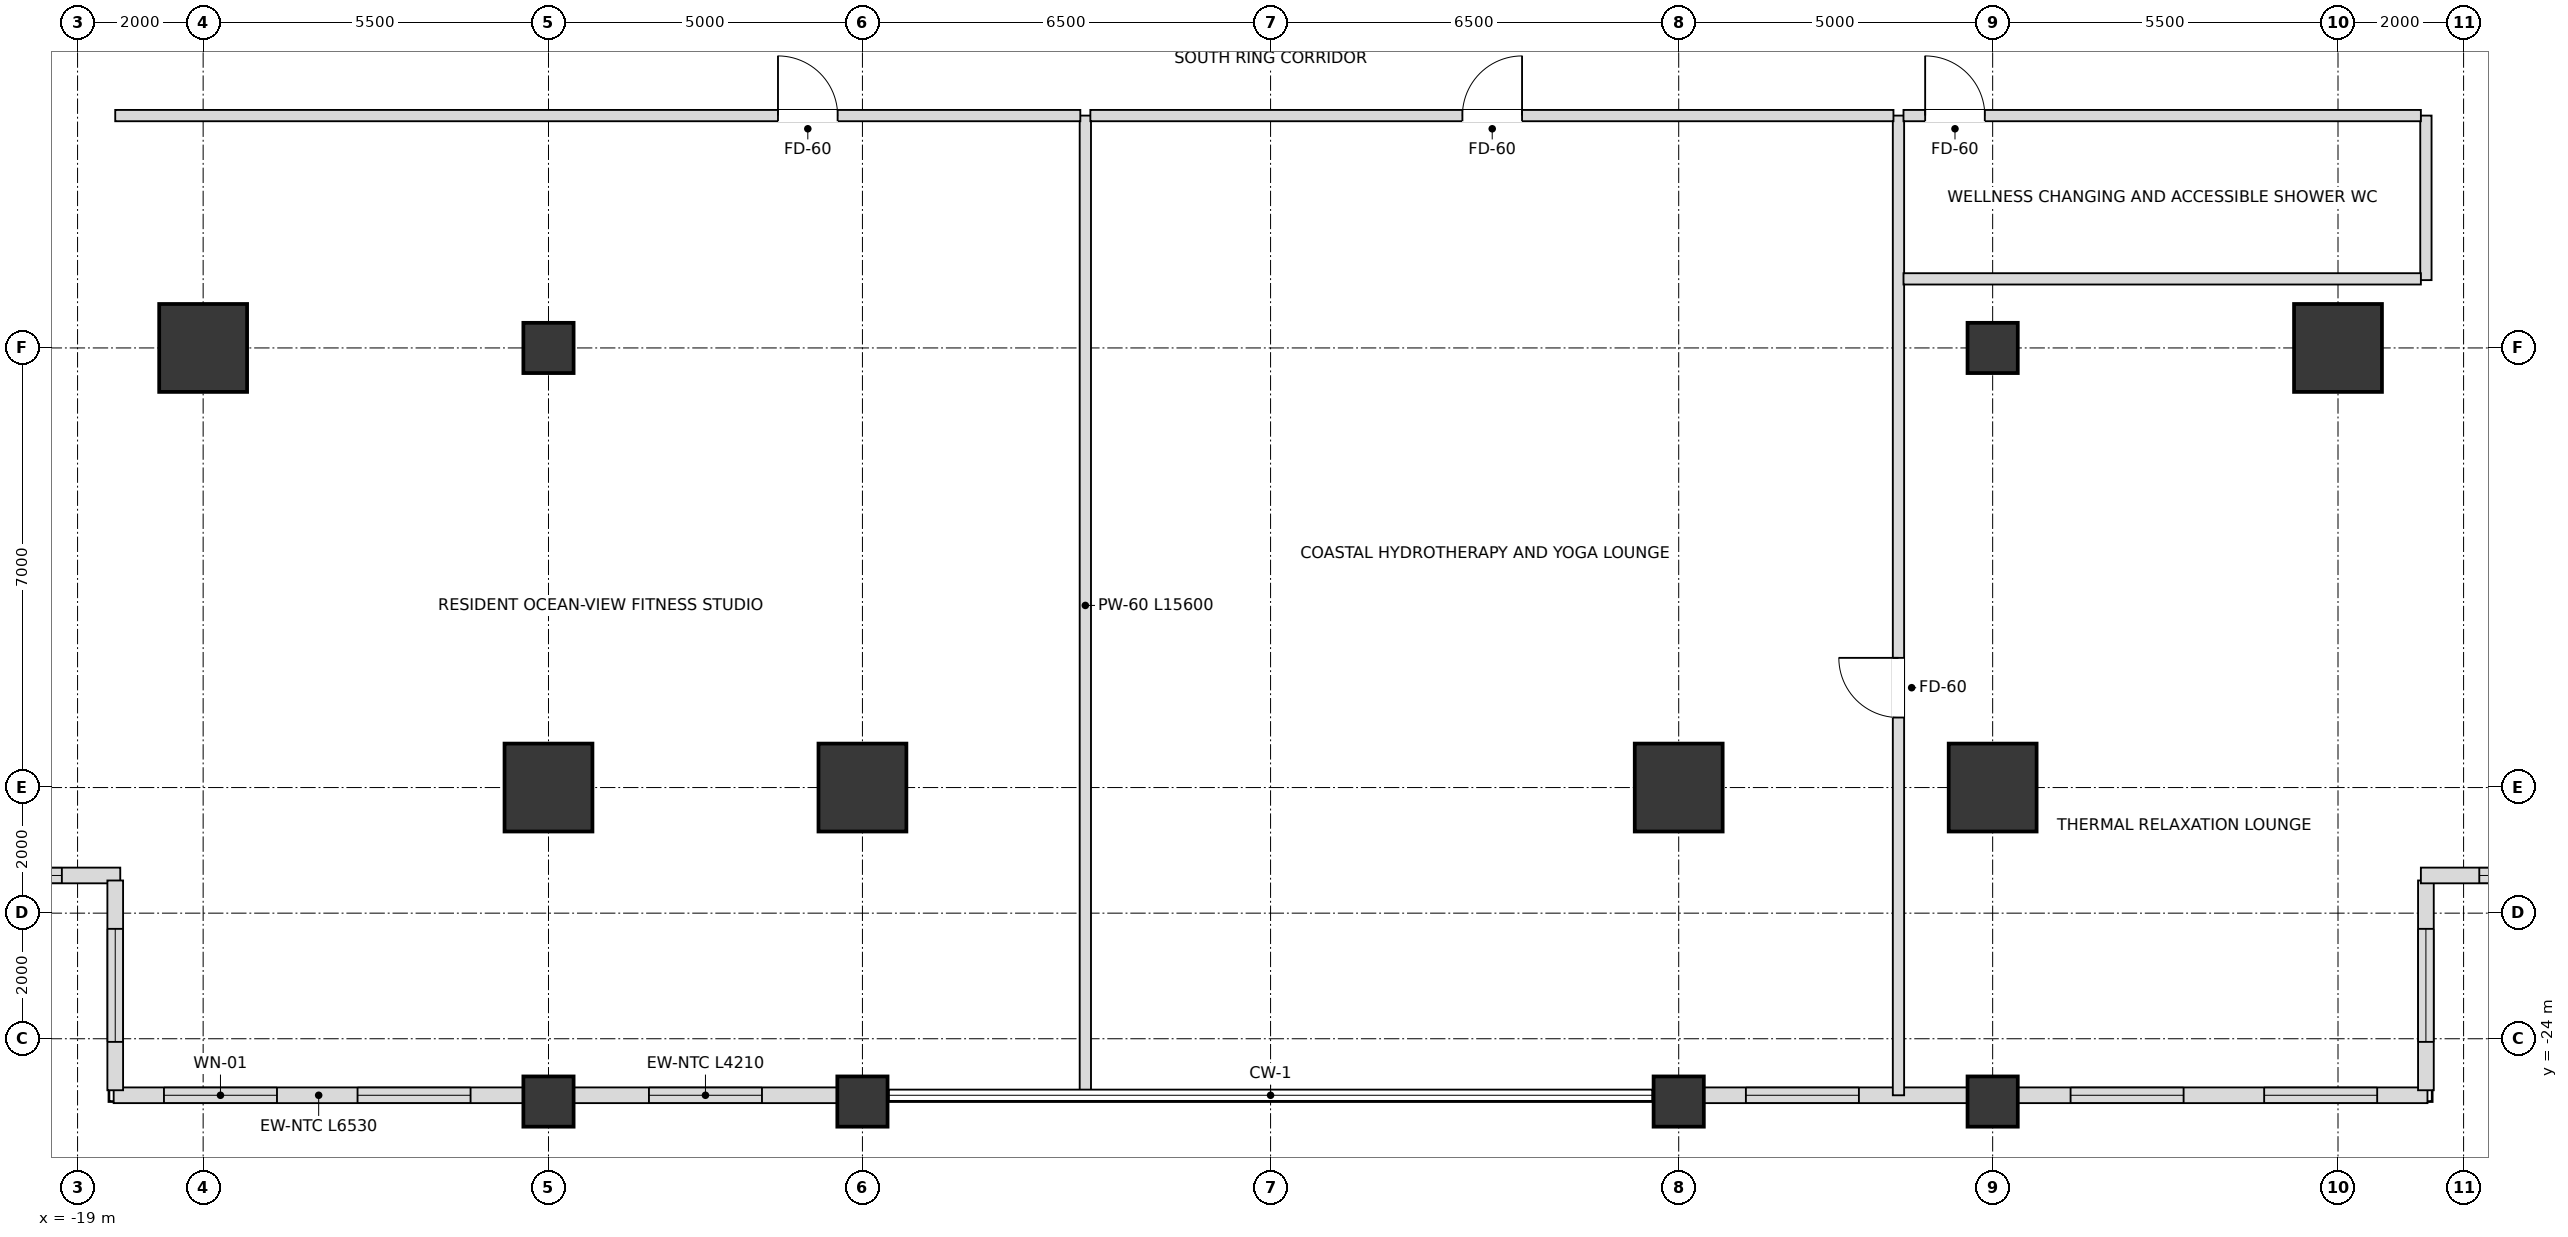
"""IFC4 building model, lengths in metres.
Left out: names, types, materials, properties, quantities, classifications, styles, units other than length and angle.
Written with IfcOpenShell. Run it as: python <this file> out.ifc"""

import sys

from ifc_helpers import new_model, si_unit, direction, frame, frame_2d, origin, origin_2d, place, context, subcontext, project, spatial, rectangle, extrude, element, fill, save


model = new_model("IFC4")
c1 = context("Model", 3, precision=1e-05, world=origin(), true_north=direction((0.0, 1.0)))
c2 = subcontext(c1, "Body", "Model", "MODEL_VIEW")
j1 = project(units=[si_unit("LENGTHUNIT", "METRE"), si_unit("PLANEANGLEUNIT", "RADIAN")], contexts=[c1])
p1 = place(None, origin())
s1 = spatial("IfcSite", under=j1, at=p1, CompositionType="ELEMENT")
p2 = place(p1, origin())
s2 = spatial("IfcBuilding", under=s1, at=p2, CompositionType="ELEMENT")
p3 = place(p2, frame((0.0, 0.0, 79.2)))
s3 = spatial("IfcBuildingStorey", under=s2, at=p3, CompositionType="ELEMENT", Elevation=79.2)
for number, where, z_axis, x_axis in (
    (1, (-11.5, -20.0, 0.0), (0.0, 0.0, 1.0), (1.0, 0.0, 0.0)),
    (2, (-6.5, -20.0, 0.0), (0.0, 0.0, 1.0), (1.0, 0.0, 0.0)),
    (3, (6.5, -20.0, 0.0), (0.0, 0.0, 1.0), (1.0, 0.0, 0.0)),
    (4, (11.5, -20.0, 0.0), (0.0, 0.0, 1.0), (1.0, 0.0, 0.0)),
    (5, (17.0, -13.0, 0.0), (0.0, 0.0, 1.0), (1.0, 0.0, 0.0)),
    (6, (-17.0, -13.0, 0.0), (0.0, 0.0, 1.0), (1.0, 0.0, 0.0)),
):
    element("IfcColumn", number, at=place(p3, frame(where, z_axis=z_axis, x_axis=x_axis)), inside=s3, PredefinedType="USERDEFINED", context=c2, shape_type="SweptSolid", body=[
        extrude(rectangle(XDim=1.4, YDim=1.4, at=origin_2d()), origin(), (0.0, 0.0, 1.0), 3.6),
    ])
for number, where, z_axis, x_axis in (
    (7, (-11.5, -13.0, 0.0), (0.0, 0.0, 1.0), (1.0, 0.0, 0.0)),
    (8, (11.5, -13.0, 0.0), (0.0, 0.0, 1.0), (1.0, 0.0, 0.0)),
    (9, (-11.5, -25.0, 0.0), (0.0, 0.0, 1.0), (1.0, 0.0, 0.0)),
    (10, (-6.5, -25.0, 0.0), (0.0, 0.0, 1.0), (1.0, 0.0, 0.0)),
    (11, (6.5, -25.0, 0.0), (0.0, 0.0, 1.0), (1.0, 0.0, 0.0)),
    (12, (11.5, -25.0, 0.0), (0.0, 0.0, 1.0), (1.0, 0.0, 0.0)),
):
    element("IfcColumn", number, at=place(p3, frame(where, z_axis=z_axis, x_axis=x_axis)), inside=s3, PredefinedType="COLUMN", context=c2, shape_type="SweptSolid", body=[
        extrude(rectangle(XDim=0.8, YDim=0.8, at=origin_2d()), origin(), (0.0, 0.0, 1.0), 3.6),
    ])
p4 = place(p3, frame((-18.425, -24.9, 0.0), z_axis=(0.0, 0.0, 1.0), x_axis=(1.0, 0.0, 0.0)))
e13 = element("IfcWall", 13, at=p4, inside=s3, PredefinedType="SOLIDWALL", context=c2, shape_type="SweptSolid", body=[
    extrude(rectangle(XDim=6.53, YDim=0.25, at=frame_2d((3.265, 0.0))), origin(), (0.0, 0.0, 1.0), 2.736),
])
p5 = place(p4, frame((0.801, 0.0, 0.72)))
e14 = element("IfcOpeningElement", 14, at=p5, cuts=e13, PredefinedType="OPENING", context=c2, shape_type="SweptSolid", body=[
    extrude(rectangle(XDim=1.8, YDim=1.68, at=frame_2d((0.9, 0.84))), frame((0.0, 0.135, 0.0), z_axis=(0.0, -1.0, 0.0), x_axis=(1.0, 0.0, 0.0)), (0.0, 0.0, 1.0), 0.27),
])
p6 = place(p4, frame((3.884, 0.0, 0.72)))
e15 = element("IfcOpeningElement", 15, at=p6, cuts=e13, PredefinedType="OPENING", context=c2, shape_type="SweptSolid", body=[
    extrude(rectangle(XDim=1.8, YDim=1.68, at=frame_2d((0.9, 0.84))), frame((0.0, 0.135, 0.0), z_axis=(0.0, -1.0, 0.0), x_axis=(1.0, 0.0, 0.0)), (0.0, 0.0, 1.0), 0.27),
])
p7 = place(p3, frame((-11.105, -24.9, 0.0), z_axis=(0.0, 0.0, 1.0), x_axis=(1.0, 0.0, 0.0)))
e16 = element("IfcWall", 16, at=p7, inside=s3, PredefinedType="SOLIDWALL", context=c2, shape_type="SweptSolid", body=[
    extrude(rectangle(XDim=4.21, YDim=0.25, at=frame_2d((2.105, 0.0))), origin(), (0.0, 0.0, 1.0), 2.736),
])
p8 = place(p7, frame((1.205, 0.0, 0.72)))
e17 = element("IfcOpeningElement", 17, at=p8, cuts=e16, PredefinedType="OPENING", context=c2, shape_type="SweptSolid", body=[
    extrude(rectangle(XDim=1.8, YDim=1.68, at=frame_2d((0.9, 0.84))), frame((0.0, 0.135, 0.0), z_axis=(0.0, -1.0, 0.0), x_axis=(1.0, 0.0, 0.0)), (0.0, 0.0, 1.0), 0.27),
])
p9 = place(p3, frame((6.895, -24.9, 0.0), z_axis=(0.0, 0.0, 1.0), x_axis=(1.0, 0.0, 0.0)))
e18 = element("IfcWall", 18, at=p9, inside=s3, PredefinedType="SOLIDWALL", context=c2, shape_type="SweptSolid", body=[
    extrude(rectangle(XDim=4.21, YDim=0.25, at=frame_2d((2.105, 0.0))), origin(), (0.0, 0.0, 1.0), 2.736),
])
p10 = place(p9, frame((0.675, 0.0, 0.72)))
e19 = element("IfcOpeningElement", 19, at=p10, cuts=e18, PredefinedType="OPENING", context=c2, shape_type="SweptSolid", body=[
    extrude(rectangle(XDim=1.8, YDim=1.68, at=frame_2d((0.9, 0.84))), frame((0.0, 0.135, 0.0), z_axis=(0.0, -1.0, 0.0), x_axis=(1.0, 0.0, 0.0)), (0.0, 0.0, 1.0), 0.27),
])
p11 = place(p3, frame((11.895, -24.9, 0.0), z_axis=(0.0, 0.0, 1.0), x_axis=(1.0, 0.0, 0.0)))
e20 = element("IfcWall", 20, at=p11, inside=s3, PredefinedType="SOLIDWALL", context=c2, shape_type="SweptSolid", body=[
    extrude(rectangle(XDim=6.53, YDim=0.25, at=frame_2d((3.265, 0.0))), origin(), (0.0, 0.0, 1.0), 2.736),
])
p12 = place(p11, frame((0.846, 0.0, 0.72)))
e21 = element("IfcOpeningElement", 21, at=p12, cuts=e20, PredefinedType="OPENING", context=c2, shape_type="SweptSolid", body=[
    extrude(rectangle(XDim=1.8, YDim=1.68, at=frame_2d((0.9, 0.84))), frame((0.0, 0.135, 0.0), z_axis=(0.0, -1.0, 0.0), x_axis=(1.0, 0.0, 0.0)), (0.0, 0.0, 1.0), 0.27),
])
p13 = place(p11, frame((3.929, 0.0, 0.72)))
e22 = element("IfcOpeningElement", 22, at=p13, cuts=e20, PredefinedType="OPENING", context=c2, shape_type="SweptSolid", body=[
    extrude(rectangle(XDim=1.8, YDim=1.68, at=frame_2d((0.9, 0.84))), frame((0.0, 0.135, 0.0), z_axis=(0.0, -1.0, 0.0), x_axis=(1.0, 0.0, 0.0)), (0.0, 0.0, 1.0), 0.27),
])
p14 = place(p3, frame((-21.98, -21.4, 0.0), z_axis=(0.0, 0.0, 1.0), x_axis=(1.0, 0.0, 0.0)))
e23 = element("IfcWall", 23, at=p14, inside=s3, PredefinedType="SOLIDWALL", context=c2, shape_type="SweptSolid", body=[
    extrude(rectangle(XDim=3.66, YDim=0.25, at=frame_2d((1.83, 0.0))), origin(), (0.0, 0.0, 1.0), 2.736),
])
p15 = place(p14, frame((0.93, 0.0, 0.72)))
e24 = element("IfcOpeningElement", 24, at=p15, cuts=e23, PredefinedType="OPENING", context=c2, shape_type="SweptSolid", body=[
    extrude(rectangle(XDim=1.8, YDim=1.68, at=frame_2d((0.9, 0.84))), frame((0.0, 0.135, 0.0), z_axis=(0.0, -1.0, 0.0), x_axis=(1.0, 0.0, 0.0)), (0.0, 0.0, 1.0), 0.27),
])
p16 = place(p3, frame((-18.4, -21.48, 0.0), z_axis=(0.0, 0.0, 1.0), x_axis=(0.0, -1.0, 0.0)))
e25 = element("IfcWall", 25, at=p16, inside=s3, PredefinedType="SOLIDWALL", context=c2, shape_type="SweptSolid", body=[
    extrude(rectangle(XDim=3.34, YDim=0.25, at=frame_2d((1.67, 0.0))), origin(), (0.0, 0.0, 1.0), 2.736),
])
p17 = place(p16, frame((0.77, 0.0, 0.72)))
e26 = element("IfcOpeningElement", 26, at=p17, cuts=e25, PredefinedType="OPENING", context=c2, shape_type="SweptSolid", body=[
    extrude(rectangle(XDim=1.8, YDim=1.68, at=frame_2d((0.9, 0.84))), frame((0.0, 0.135, 0.0), z_axis=(0.0, -1.0, 0.0), x_axis=(1.0, 0.0, 0.0)), (0.0, 0.0, 1.0), 0.27),
])
p18 = place(p3, frame((18.4, -24.82, 0.0), z_axis=(0.0, 0.0, 1.0), x_axis=(0.0, 1.0, 0.0)))
e27 = element("IfcWall", 27, at=p18, inside=s3, PredefinedType="SOLIDWALL", context=c2, shape_type="SweptSolid", body=[
    extrude(rectangle(XDim=3.34, YDim=0.25, at=frame_2d((1.67, 0.0))), origin(), (0.0, 0.0, 1.0), 2.736),
])
p19 = place(p18, frame((0.77, 0.0, 0.72)))
e28 = element("IfcOpeningElement", 28, at=p19, cuts=e27, PredefinedType="OPENING", context=c2, shape_type="SweptSolid", body=[
    extrude(rectangle(XDim=1.8, YDim=1.68, at=frame_2d((0.9, 0.84))), frame((0.0, 0.135, 0.0), z_axis=(0.0, -1.0, 0.0), x_axis=(1.0, 0.0, 0.0)), (0.0, 0.0, 1.0), 0.27),
])
p20 = place(p3, frame((18.32, -21.4, 0.0), z_axis=(0.0, 0.0, 1.0), x_axis=(1.0, 0.0, 0.0)))
e29 = element("IfcWall", 29, at=p20, inside=s3, PredefinedType="SOLIDWALL", context=c2, shape_type="SweptSolid", body=[
    extrude(rectangle(XDim=3.66, YDim=0.25, at=frame_2d((1.83, 0.0))), origin(), (0.0, 0.0, 1.0), 2.736),
])
p21 = place(p20, frame((0.93, 0.0, 0.72)))
e30 = element("IfcOpeningElement", 30, at=p21, cuts=e29, PredefinedType="OPENING", context=c2, shape_type="SweptSolid", body=[
    extrude(rectangle(XDim=1.8, YDim=1.68, at=frame_2d((0.9, 0.84))), frame((0.0, 0.135, 0.0), z_axis=(0.0, -1.0, 0.0), x_axis=(1.0, 0.0, 0.0)), (0.0, 0.0, 1.0), 0.27),
])
p22 = place(p3, frame((-2.95, -24.9, 0.0), z_axis=(0.0, 0.0, 1.0), x_axis=(0.0, 1.0, 0.0)))
e31 = element("IfcWall", 31, at=p22, inside=s3, PredefinedType="PARTITIONING", context=c2, shape_type="SweptSolid", body=[
    extrude(rectangle(XDim=15.6, YDim=0.18, at=frame_2d((7.8, 0.0))), origin(), (0.0, 0.0, 1.0), 2.816),
])
p23 = place(p3, frame((10.0, -24.9, 0.0), z_axis=(0.0, 0.0, 1.0), x_axis=(0.0, 1.0, 0.0)))
e32 = element("IfcWall", 32, at=p23, inside=s3, PredefinedType="PARTITIONING", context=c2, shape_type="SweptSolid", body=[
    extrude(rectangle(XDim=15.6, YDim=0.18, at=frame_2d((7.8, 0.0))), origin(), (0.0, 0.0, 1.0), 2.816),
])
p24 = place(p23, frame((6.015, 0.0, 0.0)))
e33 = element("IfcOpeningElement", 33, at=p24, cuts=e32, PredefinedType="OPENING", context=c2, shape_type="SweptSolid", body=[
    extrude(rectangle(XDim=0.95, YDim=2.15, at=frame_2d((0.475, 1.075))), frame((0.0, 0.1, 0.0), z_axis=(0.0, -1.0, 0.0), x_axis=(1.0, 0.0, 0.0)), (0.0, 0.0, 1.0), 0.2),
])
p25 = place(p3, frame((18.4, -11.92, 0.0), z_axis=(0.0, 0.0, 1.0), x_axis=(0.0, 1.0, 0.0)))
e34 = element("IfcWall", 34, at=p25, inside=s3, PredefinedType="PARTITIONING", context=c2, shape_type="SweptSolid", body=[
    extrude(rectangle(XDim=2.62, YDim=0.18, at=frame_2d((1.31, 0.0))), origin(), (0.0, 0.0, 1.0), 3.38),
])
p26 = place(p3, frame((10.08, -11.9, 0.0), z_axis=(0.0, 0.0, 1.0), x_axis=(1.0, 0.0, 0.0)))
e35 = element("IfcWall", 35, at=p26, inside=s3, PredefinedType="PARTITIONING", context=c2, shape_type="SweptSolid", body=[
    extrude(rectangle(XDim=8.24, YDim=0.18, at=frame_2d((4.12, 0.0))), origin(), (0.0, 0.0, 1.0), 2.816),
])
p27 = place(p3, frame((-18.4, -9.3, 0.0), z_axis=(0.0, 0.0, 1.0), x_axis=(1.0, 0.0, 0.0)))
e36 = element("IfcWall", 36, at=p27, inside=s3, PredefinedType="PARTITIONING", context=c2, shape_type="SweptSolid", body=[
    extrude(rectangle(XDim=15.37, YDim=0.18, at=frame_2d((7.685, 0.0))), origin(), (0.0, 0.0, 1.0), 2.816),
])
p28 = place(p27, frame((10.555, 0.0, 0.0)))
e37 = element("IfcOpeningElement", 37, at=p28, cuts=e36, PredefinedType="OPENING", context=c2, shape_type="SweptSolid", body=[
    extrude(rectangle(XDim=0.95, YDim=2.15, at=frame_2d((0.475, 1.075))), frame((0.0, 0.1, 0.0), z_axis=(0.0, -1.0, 0.0), x_axis=(1.0, 0.0, 0.0)), (0.0, 0.0, 1.0), 0.2),
])
p29 = place(p3, frame((-2.87, -9.3, 0.0), z_axis=(0.0, 0.0, 1.0), x_axis=(1.0, 0.0, 0.0)))
e38 = element("IfcWall", 38, at=p29, inside=s3, PredefinedType="PARTITIONING", context=c2, shape_type="SweptSolid", body=[
    extrude(rectangle(XDim=12.79, YDim=0.18, at=frame_2d((6.395, 0.0))), origin(), (0.0, 0.0, 1.0), 2.816),
])
p30 = place(p29, frame((5.925, 0.0, 0.0)))
e39 = element("IfcOpeningElement", 39, at=p30, cuts=e38, PredefinedType="OPENING", context=c2, shape_type="SweptSolid", body=[
    extrude(rectangle(XDim=0.95, YDim=2.15, at=frame_2d((0.475, 1.075))), frame((0.0, 0.1, 0.0), z_axis=(0.0, -1.0, 0.0), x_axis=(1.0, 0.0, 0.0)), (0.0, 0.0, 1.0), 0.2),
])
p31 = place(p3, frame((10.08, -9.3, 0.0), z_axis=(0.0, 0.0, 1.0), x_axis=(1.0, 0.0, 0.0)))
e40 = element("IfcWall", 40, at=p31, inside=s3, PredefinedType="PARTITIONING", context=c2, shape_type="SweptSolid", body=[
    extrude(rectangle(XDim=8.24, YDim=0.18, at=frame_2d((4.12, 0.0))), origin(), (0.0, 0.0, 1.0), 2.816),
])
p32 = place(p31, frame((0.345, 0.0, 0.0)))
e41 = element("IfcOpeningElement", 41, at=p32, cuts=e40, PredefinedType="OPENING", context=c2, shape_type="SweptSolid", body=[
    extrude(rectangle(XDim=0.95, YDim=2.15, at=frame_2d((0.475, 1.075))), frame((0.0, 0.1, 0.0), z_axis=(0.0, -1.0, 0.0), x_axis=(1.0, 0.0, 0.0)), (0.0, 0.0, 1.0), 0.2),
])
p33 = place(p5, origin())
e42 = element("IfcWindow", 42, at=p33, inside=s3, PartitioningType="SINGLE_PANEL", PredefinedType="WINDOW", context=c2, shape_type="SweptSolid", body=[
    extrude(rectangle(XDim=1.8, YDim=1.68, at=frame_2d((0.9, 0.84))), frame((0.0, 0.03, 0.0), z_axis=(0.0, -1.0, 0.0), x_axis=(1.0, 0.0, 0.0)), (0.0, 0.0, 1.0), 0.06),
])
fill(e14, e42)
p34 = place(p6, origin())
e43 = element("IfcWindow", 43, at=p34, inside=s3, PartitioningType="SINGLE_PANEL", PredefinedType="WINDOW", context=c2, shape_type="SweptSolid", body=[
    extrude(rectangle(XDim=1.8, YDim=1.68, at=frame_2d((0.9, 0.84))), frame((0.0, 0.03, 0.0), z_axis=(0.0, -1.0, 0.0), x_axis=(1.0, 0.0, 0.0)), (0.0, 0.0, 1.0), 0.06),
])
fill(e15, e43)
p35 = place(p8, origin())
e44 = element("IfcWindow", 44, at=p35, inside=s3, PartitioningType="SINGLE_PANEL", PredefinedType="WINDOW", context=c2, shape_type="SweptSolid", body=[
    extrude(rectangle(XDim=1.8, YDim=1.68, at=frame_2d((0.9, 0.84))), frame((0.0, 0.03, 0.0), z_axis=(0.0, -1.0, 0.0), x_axis=(1.0, 0.0, 0.0)), (0.0, 0.0, 1.0), 0.06),
])
fill(e17, e44)
p36 = place(p10, origin())
e45 = element("IfcWindow", 45, at=p36, inside=s3, PartitioningType="SINGLE_PANEL", PredefinedType="WINDOW", context=c2, shape_type="SweptSolid", body=[
    extrude(rectangle(XDim=1.8, YDim=1.68, at=frame_2d((0.9, 0.84))), frame((0.0, 0.03, 0.0), z_axis=(0.0, -1.0, 0.0), x_axis=(1.0, 0.0, 0.0)), (0.0, 0.0, 1.0), 0.06),
])
fill(e19, e45)
p37 = place(p12, origin())
e46 = element("IfcWindow", 46, at=p37, inside=s3, PartitioningType="SINGLE_PANEL", PredefinedType="WINDOW", context=c2, shape_type="SweptSolid", body=[
    extrude(rectangle(XDim=1.8, YDim=1.68, at=frame_2d((0.9, 0.84))), frame((0.0, 0.03, 0.0), z_axis=(0.0, -1.0, 0.0), x_axis=(1.0, 0.0, 0.0)), (0.0, 0.0, 1.0), 0.06),
])
fill(e21, e46)
p38 = place(p13, origin())
e47 = element("IfcWindow", 47, at=p38, inside=s3, PartitioningType="SINGLE_PANEL", PredefinedType="WINDOW", context=c2, shape_type="SweptSolid", body=[
    extrude(rectangle(XDim=1.8, YDim=1.68, at=frame_2d((0.9, 0.84))), frame((0.0, 0.03, 0.0), z_axis=(0.0, -1.0, 0.0), x_axis=(1.0, 0.0, 0.0)), (0.0, 0.0, 1.0), 0.06),
])
fill(e22, e47)
p39 = place(p15, origin())
e48 = element("IfcWindow", 48, at=p39, inside=s3, PartitioningType="SINGLE_PANEL", PredefinedType="WINDOW", context=c2, shape_type="SweptSolid", body=[
    extrude(rectangle(XDim=1.8, YDim=1.68, at=frame_2d((0.9, 0.84))), frame((0.0, 0.03, 0.0), z_axis=(0.0, -1.0, 0.0), x_axis=(1.0, 0.0, 0.0)), (0.0, 0.0, 1.0), 0.06),
])
fill(e24, e48)
p40 = place(p17, origin())
e49 = element("IfcWindow", 49, at=p40, inside=s3, PartitioningType="SINGLE_PANEL", PredefinedType="WINDOW", context=c2, shape_type="SweptSolid", body=[
    extrude(rectangle(XDim=1.8, YDim=1.68, at=frame_2d((0.9, 0.84))), frame((0.0, 0.03, 0.0), z_axis=(0.0, -1.0, 0.0), x_axis=(1.0, 0.0, 0.0)), (0.0, 0.0, 1.0), 0.06),
])
fill(e26, e49)
p41 = place(p19, origin())
e50 = element("IfcWindow", 50, at=p41, inside=s3, PartitioningType="SINGLE_PANEL", PredefinedType="WINDOW", context=c2, shape_type="SweptSolid", body=[
    extrude(rectangle(XDim=1.8, YDim=1.68, at=frame_2d((0.9, 0.84))), frame((0.0, 0.03, 0.0), z_axis=(0.0, -1.0, 0.0), x_axis=(1.0, 0.0, 0.0)), (0.0, 0.0, 1.0), 0.06),
])
fill(e28, e50)
p42 = place(p21, origin())
e51 = element("IfcWindow", 51, at=p42, inside=s3, PartitioningType="SINGLE_PANEL", PredefinedType="WINDOW", context=c2, shape_type="SweptSolid", body=[
    extrude(rectangle(XDim=1.8, YDim=1.68, at=frame_2d((0.9, 0.84))), frame((0.0, 0.03, 0.0), z_axis=(0.0, -1.0, 0.0), x_axis=(1.0, 0.0, 0.0)), (0.0, 0.0, 1.0), 0.06),
])
fill(e30, e51)
p43 = place(p32, origin())
e52 = element("IfcDoor", 52, at=p43, inside=s3, OperationType="SINGLE_SWING_LEFT", PredefinedType="DOOR", context=c2, shape_type="SweptSolid", body=[
    extrude(rectangle(XDim=0.95, YDim=2.15, at=frame_2d((0.475, 1.075))), frame((0.0, 0.025, 0.0), z_axis=(0.0, -1.0, 0.0), x_axis=(1.0, 0.0, 0.0)), (0.0, 0.0, 1.0), 0.05),
])
fill(e41, e52)
p44 = place(p24, origin())
e53 = element("IfcDoor", 53, at=p44, inside=s3, OperationType="SINGLE_SWING_RIGHT", PredefinedType="DOOR", context=c2, shape_type="SweptSolid", body=[
    extrude(rectangle(XDim=0.95, YDim=2.15, at=frame_2d((0.475, 1.075))), frame((0.0, 0.025, 0.0), z_axis=(0.0, -1.0, 0.0), x_axis=(1.0, 0.0, 0.0)), (0.0, 0.0, 1.0), 0.05),
])
fill(e33, e53)
p45 = place(p28, origin())
e54 = element("IfcDoor", 54, at=p45, inside=s3, OperationType="SINGLE_SWING_LEFT", PredefinedType="DOOR", context=c2, shape_type="SweptSolid", body=[
    extrude(rectangle(XDim=0.95, YDim=2.15, at=frame_2d((0.475, 1.075))), frame((0.0, 0.025, 0.0), z_axis=(0.0, -1.0, 0.0), x_axis=(1.0, 0.0, 0.0)), (0.0, 0.0, 1.0), 0.05),
])
fill(e37, e54)
p46 = place(p30, origin())
e55 = element("IfcDoor", 55, at=p46, inside=s3, OperationType="SINGLE_SWING_RIGHT", PredefinedType="DOOR", context=c2, shape_type="SweptSolid", body=[
    extrude(rectangle(XDim=0.95, YDim=2.15, at=frame_2d((0.475, 1.075))), frame((0.0, 0.025, 0.0), z_axis=(0.0, -1.0, 0.0), x_axis=(1.0, 0.0, 0.0)), (0.0, 0.0, 1.0), 0.05),
])
fill(e39, e55)
save(model, sys.argv[1])
